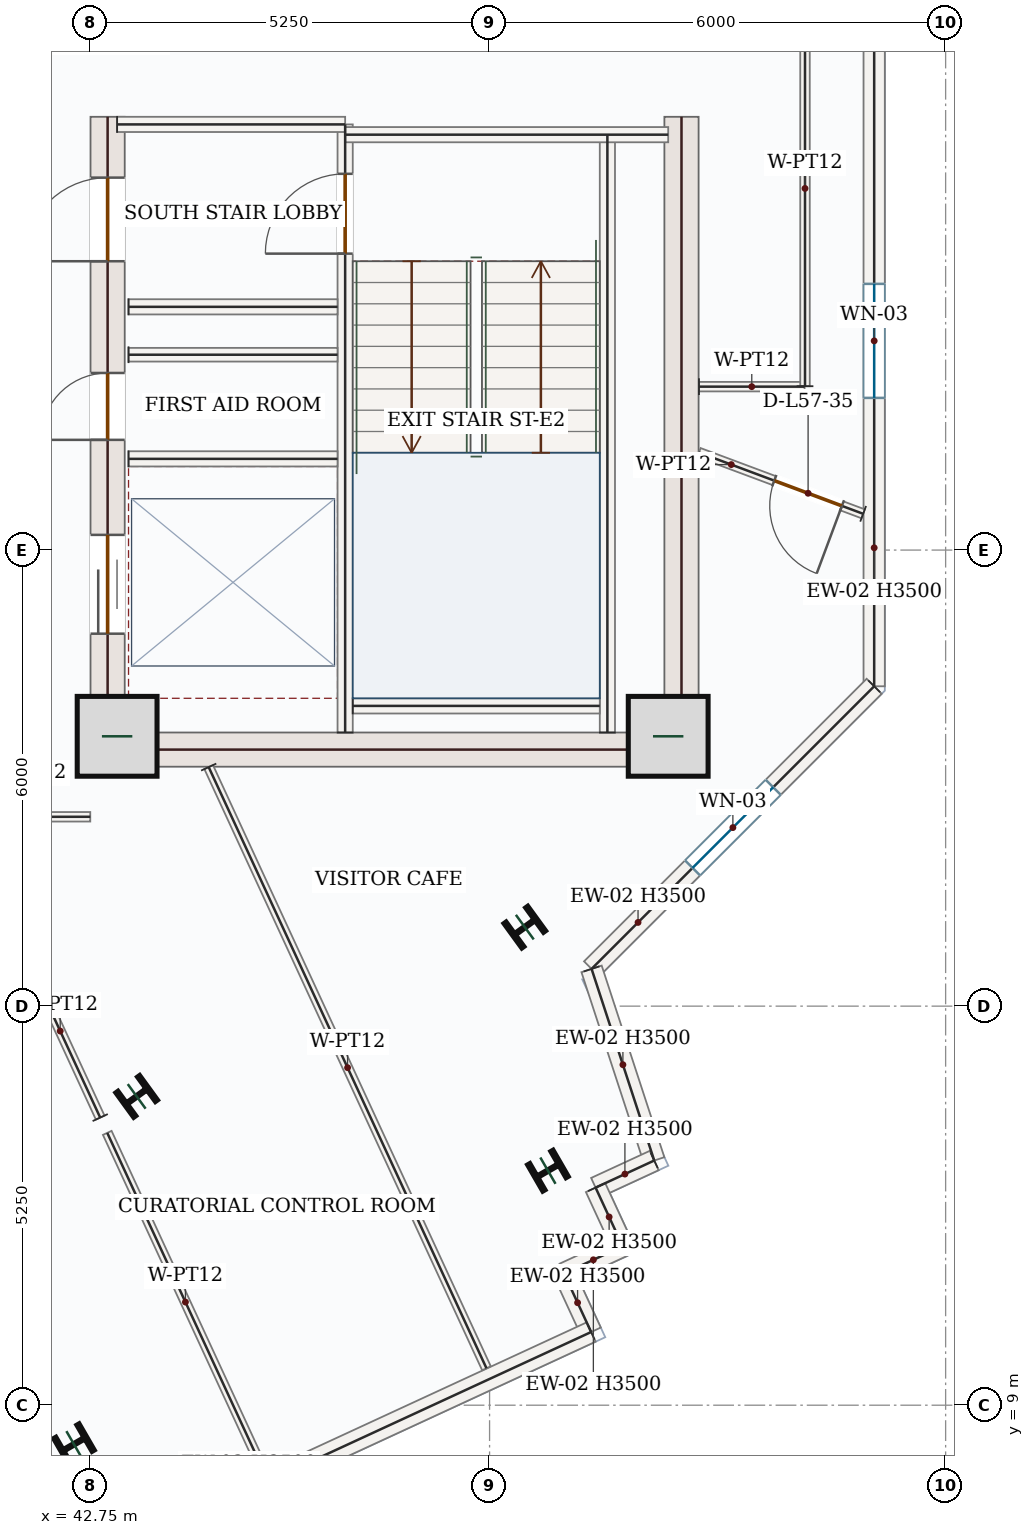
"""IFC4 building model, lengths in metres.
Left out: names, types, materials, properties, quantities, classifications, styles, units other than length and angle.
Written with IfcOpenShell. Run it as: python <this file> out.ifc"""

import sys

from ifc_helpers import new_model, si_unit, direction, frame, frame_2d, origin, origin_2d, place, context, subcontext, project, spatial, rectangle, i_section, extrude, source, transform, mapped, element, fill, save


model = new_model("IFC4")
c1 = context("Model", 3, precision=1e-05, world=origin(), true_north=direction((0.0, 1.0)))
c2 = subcontext(c1, "Body", "Model", "MODEL_VIEW")
j1 = project(units=[si_unit("LENGTHUNIT", "METRE"), si_unit("PLANEANGLEUNIT", "RADIAN")], contexts=[c1])
p1 = place(None, origin())
s1 = spatial("IfcSite", under=j1, at=p1, CompositionType="ELEMENT")
p2 = place(p1, origin())
s2 = spatial("IfcBuilding", under=s1, at=p2, CompositionType="ELEMENT")
p3 = place(p2, frame((0.0, 0.0, 242.85)))
s3 = spatial("IfcBuildingStorey", under=s2, at=p3, CompositionType="ELEMENT", Elevation=242.85)
p4 = place(p3, frame((42.975, 17.4, 0.0), z_axis=(0.0, 0.0, 1.0), x_axis=(0.0, 1.0, 0.0)))
e1 = element("IfcWall", 1, at=p4, inside=s3, PredefinedType="SHEAR", context=c2, shape_type="SweptSolid", body=[
    extrude(rectangle(XDim=8.55, YDim=0.45, at=frame_2d((4.275, 0.0))), origin(), (0.0, 0.0, 1.0), 3.5),
])
p5 = place(p4, frame((6.65, 0.0, 0.0)))
e2 = element("IfcOpeningElement", 2, at=p5, cuts=e1, PredefinedType="OPENING", context=c2, shape_type="SweptSolid", body=[
    extrude(rectangle(XDim=1.1, YDim=2.2, at=frame_2d((0.55, 1.1))), frame((0.0, 0.235, 0.0), z_axis=(0.0, -1.0, 0.0), x_axis=(1.0, 0.0, 0.0)), (0.0, 0.0, 1.0), 0.47),
])
p6 = place(p4, frame((1.75, 0.0, 0.0)))
e3 = element("IfcOpeningElement", 3, at=p6, cuts=e1, PredefinedType="OPENING", context=c2, shape_type="SweptSolid", body=[
    extrude(rectangle(XDim=1.3, YDim=2.2, at=frame_2d((0.65, 1.1))), frame((0.0, 0.235, 0.0), z_axis=(0.0, -1.0, 0.0), x_axis=(1.0, 0.0, 0.0)), (0.0, 0.0, 1.0), 0.47),
])
p7 = place(p4, frame((4.3, 0.0, 0.0)))
e4 = element("IfcOpeningElement", 4, at=p7, cuts=e1, PredefinedType="OPENING", context=c2, shape_type="SweptSolid", body=[
    extrude(rectangle(XDim=0.88, YDim=2.1, at=frame_2d((0.44, 1.05))), frame((0.0, 0.235, 0.0), z_axis=(0.0, -1.0, 0.0), x_axis=(1.0, 0.0, 0.0)), (0.0, 0.0, 1.0), 0.47),
])
m1 = source(origin(), c2, "Body", "SweptSolid", [
    extrude(rectangle(XDim=8.55, YDim=0.45, at=frame_2d((4.275, 0.0))), origin(), (0.0, 0.0, 1.0), 3.5),
])
p8 = place(p3, frame((50.525, 17.4, 0.0), z_axis=(0.0, 0.0, 1.0), x_axis=(0.0, 1.0, 0.0)))
e5 = element("IfcWall", 5, at=p8, inside=s3, PredefinedType="SHEAR", context=c2, shape_type="MappedRepresentation", body=[
    mapped(m1, transform((0.0, 0.0, 0.0), x_axis=(1.0, 0.0, 0.0), y_axis=(0.0, 1.0, 0.0), z_axis=(0.0, 0.0, 1.0), scale=1.0)),
])
m2 = source(origin(), c2, "Body", "SweptSolid", [
    extrude(rectangle(XDim=7.1, YDim=0.45, at=frame_2d((3.55, 0.0))), origin(), (0.0, 0.0, 1.0), 3.5),
])
p9 = place(p3, frame((43.2, 17.625, 0.0), z_axis=(0.0, 0.0, 1.0), x_axis=(1.0, 0.0, 0.0)))
e6 = element("IfcWall", 6, at=p9, inside=s3, PredefinedType="SHEAR", context=c2, shape_type="MappedRepresentation", body=[
    mapped(m2, transform((0.0, 0.0, 0.0), x_axis=(1.0, 0.0, 0.0), y_axis=(0.0, 1.0, 0.0), z_axis=(0.0, 0.0, 1.0), scale=1.0)),
])
m3 = source(origin(), c2, "Body", "SweptSolid", [
    extrude(rectangle(XDim=1.05, YDim=1.05, at=origin_2d()), origin(), (0.0, 0.0, 1.0), 3.75),
])
for number, where, z_axis, x_axis in (
    (7, (43.1, 17.8, 0.0), (0.0, 0.0, 1.0), (1.0, 0.0, 0.0)),
    (8, (50.35, 17.8, 0.0), (0.0, 0.0, 1.0), (1.0, 0.0, 0.0)),
):
    element("IfcColumn", number, at=place(p3, frame(where, z_axis=z_axis, x_axis=x_axis)), inside=s3, PredefinedType="COLUMN", context=c2, shape_type="MappedRepresentation", body=[
        mapped(m3, transform((0.0, 0.0, 0.0), x_axis=(1.0, 0.0, 0.0), y_axis=(0.0, 1.0, 0.0), z_axis=(0.0, 0.0, 1.0), scale=1.0)),
    ])
m4 = source(origin(), c2, "Body", "SweptSolid", [
    extrude(i_section(OverallWidth=0.399, OverallDepth=0.386, WebThickness=0.021, FlangeThickness=0.033, FilletRadius=0.018, at=origin_2d()), origin(), (0.0, 0.0, 1.0), 3.75),
])
for number, where, z_axis, x_axis in (
    (9, (43.357, 13.063, 0.0), (0.0, 0.0, 1.0), (-0.588, 0.809, 0.0)),
    (10, (48.464, 15.289, 0.0), (0.0, 0.0, 1.0), (-0.588, 0.809, 0.0)),
    (11, (42.532, 8.486, 0.0), (0.0, 0.0, 1.0), (-0.5, 0.866, 0.0)),
    (12, (48.768, 12.086, 0.0), (0.0, 0.0, 1.0), (-0.5, 0.866, 0.0)),
):
    element("IfcColumn", number, at=place(p3, frame(where, z_axis=z_axis, x_axis=x_axis)), inside=s3, PredefinedType="COLUMN", context=c2, shape_type="MappedRepresentation", body=[
        mapped(m4, transform((0.0, 0.0, 0.0), x_axis=(1.0, 0.0, 0.0), y_axis=(0.0, 1.0, 0.0), z_axis=(0.0, 0.0, 1.0), scale=1.0)),
    ])
p10 = place(p3, frame((53.06, 27.546, 0.0), z_axis=(0.0, 0.0, 1.0), x_axis=(0.0, -1.0, 0.0)))
e13 = element("IfcWall", 13, at=p10, inside=s3, PredefinedType="SOLIDWALL", context=c2, shape_type="SweptSolid", body=[
    extrude(rectangle(XDim=9.088, YDim=0.28, at=frame_2d((4.544, 0.0))), origin(), (0.0, 0.0, 1.0), 3.5),
])
p11 = place(p10, frame((3.794, 0.0, 0.85)))
e14 = element("IfcOpeningElement", 14, at=p11, cuts=e13, PredefinedType="OPENING", context=c2, shape_type="SweptSolid", body=[
    extrude(rectangle(XDim=1.5, YDim=1.5, at=frame_2d((0.75, 0.75))), frame((0.0, 0.15, 0.0), z_axis=(0.0, -1.0, 0.0), x_axis=(1.0, 0.0, 0.0)), (0.0, 0.0, 1.0), 0.3),
])
p12 = place(p3, frame((53.06, 18.458, 0.0), z_axis=(0.0, 0.0, 1.0), x_axis=(-0.707106781187, -0.707106781187, 0.0)))
e15 = element("IfcWall", 15, at=p12, inside=s3, PredefinedType="SOLIDWALL", context=c2, shape_type="SweptSolid", body=[
    extrude(rectangle(XDim=5.258, YDim=0.28, at=frame_2d((2.629, 0.0))), origin(), (0.0, 0.0, 1.0), 3.5),
])
p13 = place(p12, frame((1.879, 0.0, 0.85)))
e16 = element("IfcOpeningElement", 16, at=p13, cuts=e15, PredefinedType="OPENING", context=c2, shape_type="SweptSolid", body=[
    extrude(rectangle(XDim=1.5, YDim=1.5, at=frame_2d((0.75, 0.75))), frame((0.0, 0.15, 0.0), z_axis=(0.0, -1.0, 0.0), x_axis=(1.0, 0.0, 0.0)), (0.0, 0.0, 1.0), 0.3),
])
m5 = source(origin(), c2, "Body", "SweptSolid", [
    extrude(rectangle(XDim=2.652, YDim=0.28, at=frame_2d((1.326, 0.0))), origin(), (0.0, 0.0, 1.0), 3.5),
])
p14 = place(p3, frame((49.342, 14.74, 0.0), z_axis=(0.0, 0.0, 1.0), x_axis=(0.310838004308, -0.950462905682, 0.0)))
e17 = element("IfcWall", 17, at=p14, inside=s3, PredefinedType="SOLIDWALL", context=c2, shape_type="MappedRepresentation", body=[
    mapped(m5, transform((0.0, 0.0, 0.0), x_axis=(1.0, 0.0, 0.0), y_axis=(0.0, 1.0, 0.0), z_axis=(0.0, 0.0, 1.0), scale=1.0)),
])
m6 = source(origin(), c2, "Body", "SweptSolid", [
    extrude(rectangle(XDim=0.85, YDim=0.28, at=frame_2d((0.425, 0.0))), origin(), (0.0, 0.0, 1.0), 3.5),
])
for number, where, z_axis, x_axis in (
    (18, (50.167, 12.219, 0.0), (0.0, 0.0, 1.0), (-0.908, -0.419, 0.0)),
    (19, (49.395, 11.863, 0.0), (0.0, 0.0, 1.0), (0.419, -0.908, 0.0)),
):
    element("IfcWall", number, at=place(p3, frame(where, z_axis=z_axis, x_axis=x_axis)), inside=s3, PredefinedType="SOLIDWALL", context=c2, shape_type="MappedRepresentation", body=[
        mapped(m6, transform((0.0, 0.0, 0.0), x_axis=(1.0, 0.0, 0.0), y_axis=(0.0, 1.0, 0.0), z_axis=(0.0, 0.0, 1.0), scale=1.0)),
    ])
m7 = source(origin(), c2, "Body", "SweptSolid", [
    extrude(rectangle(XDim=0.85, YDim=0.28, at=frame_2d((0.425, 0.0))), origin(), (0.0, 0.0, 1.0), 3.5),
])
p15 = place(p3, frame((49.751, 11.091, 0.0), z_axis=(0.0, 0.0, 1.0), x_axis=(-0.907791150023, -0.419422493365, 0.0)))
e20 = element("IfcWall", 20, at=p15, inside=s3, PredefinedType="SOLIDWALL", context=c2, shape_type="MappedRepresentation", body=[
    mapped(m7, transform((0.0, 0.0, 0.0), x_axis=(1.0, 0.0, 0.0), y_axis=(0.0, 1.0, 0.0), z_axis=(0.0, 0.0, 1.0), scale=1.0)),
])
p16 = place(p3, frame((48.98, 10.734, 0.0), z_axis=(0.0, 0.0, 1.0), x_axis=(0.419313139191, -0.907841666427, 0.0)))
e21 = element("IfcWall", 21, at=p16, inside=s3, PredefinedType="SOLIDWALL", context=c2, shape_type="MappedRepresentation", body=[
    mapped(m6, transform((0.0, 0.0, 0.0), x_axis=(1.0, 0.0, 0.0), y_axis=(0.0, 1.0, 0.0), z_axis=(0.0, 0.0, 1.0), scale=1.0)),
])
m8 = source(origin(), c2, "Body", "SweptSolid", [
    extrude(rectangle(XDim=9.92, YDim=0.28, at=frame_2d((4.96, 0.0))), origin(), (0.0, 0.0, 1.0), 3.5),
])
p17 = place(p3, frame((49.336, 9.963, 0.0), z_axis=(0.0, 0.0, 1.0), x_axis=(-0.907779940536, -0.419446754143, 0.0)))
e22 = element("IfcWall", 22, at=p17, inside=s3, PredefinedType="SOLIDWALL", context=c2, shape_type="MappedRepresentation", body=[
    mapped(m8, transform((0.0, 0.0, 0.0), x_axis=(1.0, 0.0, 0.0), y_axis=(0.0, 1.0, 0.0), z_axis=(0.0, 0.0, 1.0), scale=1.0)),
])
m9 = source(origin(), c2, "Body", "SweptSolid", [
    extrude(rectangle(XDim=7.87, YDim=0.2, at=frame_2d((3.935, 0.0))), origin(), (0.0, 0.0, 1.0), 3.5),
])
p18 = place(p3, frame((49.55, 17.85, 0.0), z_axis=(0.0, 0.0, 1.0), x_axis=(0.0, 1.0, 0.0)))
e23 = element("IfcWall", 23, at=p18, inside=s3, PredefinedType="SOLIDWALL", context=c2, shape_type="MappedRepresentation", body=[
    mapped(m9, transform((0.0, 0.0, 0.0), x_axis=(1.0, 0.0, 0.0), y_axis=(0.0, 1.0, 0.0), z_axis=(0.0, 0.0, 1.0), scale=1.0)),
])
p19 = place(p3, frame((46.1, 17.85, 0.0), z_axis=(0.0, 0.0, 1.0), x_axis=(0.0, 1.0, 0.0)))
e24 = element("IfcWall", 24, at=p19, inside=s3, PredefinedType="SOLIDWALL", context=c2, shape_type="SweptSolid", body=[
    extrude(rectangle(XDim=8.0, YDim=0.2, at=frame_2d((4.0, 0.0))), origin(), (0.0, 0.0, 1.0), 3.5),
])
p20 = place(p19, frame((6.3, 0.0, 0.0)))
e25 = element("IfcOpeningElement", 25, at=p20, cuts=e24, PredefinedType="OPENING", context=c2, shape_type="SweptSolid", body=[
    extrude(rectangle(XDim=1.05, YDim=2.15, at=frame_2d((0.525, 1.075))), frame((0.0, 0.11, 0.0), z_axis=(0.0, -1.0, 0.0), x_axis=(1.0, 0.0, 0.0)), (0.0, 0.0, 1.0), 0.22),
])
m10 = source(origin(), c2, "Body", "SweptSolid", [
    extrude(rectangle(XDim=3.0, YDim=0.2, at=frame_2d((1.5, 0.0))), origin(), (0.0, 0.0, 1.0), 3.5),
])
p21 = place(p3, frame((43.1, 25.85, 0.0), z_axis=(0.0, 0.0, 1.0), x_axis=(1.0, 0.0, 0.0)))
e26 = element("IfcWall", 26, at=p21, inside=s3, PredefinedType="SOLIDWALL", context=c2, shape_type="MappedRepresentation", body=[
    mapped(m10, transform((0.0, 0.0, 0.0), x_axis=(1.0, 0.0, 0.0), y_axis=(0.0, 1.0, 0.0), z_axis=(0.0, 0.0, 1.0), scale=1.0)),
])
m11 = source(origin(), c2, "Body", "SweptSolid", [
    extrude(rectangle(XDim=4.25, YDim=0.2, at=frame_2d((2.125, 0.0))), origin(), (0.0, 0.0, 1.0), 3.5),
])
p22 = place(p3, frame((46.1, 25.715, 0.0), z_axis=(0.0, 0.0, 1.0), x_axis=(1.0, 0.0, 0.0)))
e27 = element("IfcWall", 27, at=p22, inside=s3, PredefinedType="SOLIDWALL", context=c2, shape_type="MappedRepresentation", body=[
    mapped(m11, transform((0.0, 0.0, 0.0), x_axis=(1.0, 0.0, 0.0), y_axis=(0.0, 1.0, 0.0), z_axis=(0.0, 0.0, 1.0), scale=1.0)),
])
m12 = source(origin(), c2, "Body", "SweptSolid", [
    extrude(rectangle(XDim=3.25, YDim=0.2, at=frame_2d((1.625, 0.0))), origin(), (0.0, 0.0, 1.0), 3.5),
])
p23 = place(p3, frame((46.2, 18.2, 0.0), z_axis=(0.0, 0.0, 1.0), x_axis=(1.0, 0.0, 0.0)))
e28 = element("IfcWall", 28, at=p23, inside=s3, PredefinedType="SOLIDWALL", context=c2, shape_type="MappedRepresentation", body=[
    mapped(m12, transform((0.0, 0.0, 0.0), x_axis=(1.0, 0.0, 0.0), y_axis=(0.0, 1.0, 0.0), z_axis=(0.0, 0.0, 1.0), scale=1.0)),
])
m13 = source(origin(), c2, "Body", "SweptSolid", [
    extrude(rectangle(XDim=2.75, YDim=0.2, at=frame_2d((1.375, 0.0))), origin(), (0.0, 0.0, 1.0), 3.5),
])
for number, where, z_axis, x_axis in (
    (29, (43.25, 23.45, 0.0), (0.0, 0.0, 1.0), (1.0, 0.0, 0.0)),
    (30, (43.25, 21.45, 0.0), (0.0, 0.0, 1.0), (1.0, 0.0, 0.0)),
):
    element("IfcWall", number, at=place(p3, frame(where, z_axis=z_axis, x_axis=x_axis)), inside=s3, PredefinedType="SOLIDWALL", context=c2, shape_type="MappedRepresentation", body=[
        mapped(m13, transform((0.0, 0.0, 0.0), x_axis=(1.0, 0.0, 0.0), y_axis=(0.0, 1.0, 0.0), z_axis=(0.0, 0.0, 1.0), scale=1.0)),
    ])
m14 = source(origin(), c2, "Body", "SweptSolid", [
    extrude(rectangle(XDim=2.75, YDim=0.18, at=frame_2d((1.375, 0.0))), origin(), (0.0, 0.0, 1.0), 3.5),
])
p24 = place(p3, frame((43.25, 22.82, 0.0), z_axis=(0.0, 0.0, 1.0), x_axis=(1.0, 0.0, 0.0)))
e31 = element("IfcWall", 31, at=p24, inside=s3, PredefinedType="PARTITIONING", context=c2, shape_type="MappedRepresentation", body=[
    mapped(m14, transform((0.0, 0.0, 0.0), x_axis=(1.0, 0.0, 0.0), y_axis=(0.0, 1.0, 0.0), z_axis=(0.0, 0.0, 1.0), scale=1.0)),
])
m15 = source(origin(), c2, "Body", "SweptSolid", [
    extrude(rectangle(XDim=4.904, YDim=0.125, at=frame_2d((2.452, 0.0))), origin(), (0.0, 0.0, 1.0), 3.5),
])
p25 = place(p3, frame((45.027, 8.131, 0.0), z_axis=(0.0, 0.0, 1.0), x_axis=(-0.419459107568, 0.907774232438, 0.0)))
e32 = element("IfcWall", 32, at=p25, inside=s3, PredefinedType="PARTITIONING", context=c2, shape_type="MappedRepresentation", body=[
    mapped(m15, transform((0.0, 0.0, 0.0), x_axis=(1.0, 0.0, 0.0), y_axis=(0.0, 1.0, 0.0), z_axis=(0.0, 0.0, 1.0), scale=1.0)),
])
p26 = place(p3, frame((42.877, 12.784, 0.0), z_axis=(0.0, 0.0, 1.0), x_axis=(-0.419416941906, 0.907793714917, 0.0)))
e33 = element("IfcWall", 33, at=p26, inside=s3, PredefinedType="PARTITIONING", context=c2, shape_type="SweptSolid", body=[
    extrude(rectangle(XDim=4.358, YDim=0.125, at=frame_2d((2.179, 0.0))), origin(), (0.0, 0.0, 1.0), 3.5),
])
p27 = place(p26, frame((2.658, 0.0, 0.0)))
e34 = element("IfcOpeningElement", 34, at=p27, cuts=e33, PredefinedType="OPENING", context=c2, shape_type="SweptSolid", body=[
    extrude(rectangle(XDim=0.95, YDim=2.15, at=frame_2d((0.475, 1.075))), frame((0.0, 0.073, 0.0), z_axis=(0.0, -1.0, 0.0), x_axis=(1.0, 0.0, 0.0)), (0.0, 0.0, 1.0), 0.145),
])
m16 = source(origin(), c2, "Body", "SweptSolid", [
    extrude(rectangle(XDim=1.623, YDim=0.125, at=frame_2d((0.812, 0.0))), origin(), (0.0, 0.0, 1.0), 3.5),
])
p28 = place(p3, frame((41.124, 16.74, 0.0), z_axis=(0.0, 0.0, 1.0), x_axis=(0.999999717168, 0.000752105684, 0.0)))
e35 = element("IfcWall", 35, at=p28, inside=s3, PredefinedType="PARTITIONING", context=c2, shape_type="MappedRepresentation", body=[
    mapped(m16, transform((0.0, 0.0, 0.0), x_axis=(1.0, 0.0, 0.0), y_axis=(0.0, 1.0, 0.0), z_axis=(0.0, 0.0, 1.0), scale=1.0)),
])
m17 = source(origin(), c2, "Body", "SweptSolid", [
    extrude(rectangle(XDim=8.712, YDim=0.125, at=frame_2d((4.356, 0.0))), origin(), (0.0, 0.0, 1.0), 3.5),
])
p29 = place(p3, frame((44.305, 17.395, 0.0), z_axis=(0.0, 0.0, 1.0), x_axis=(0.419438424399, -0.907783789312, 0.0)))
e36 = element("IfcWall", 36, at=p29, inside=s3, PredefinedType="PARTITIONING", context=c2, shape_type="MappedRepresentation", body=[
    mapped(m17, transform((0.0, 0.0, 0.0), x_axis=(1.0, 0.0, 0.0), y_axis=(0.0, 1.0, 0.0), z_axis=(0.0, 0.0, 1.0), scale=1.0)),
])
m18 = source(origin(), c2, "Body", "SweptSolid", [
    extrude(rectangle(XDim=1.389, YDim=0.125, at=frame_2d((0.695, 0.0))), origin(), (0.0, 0.0, 1.0), 3.5),
])
p30 = place(p3, frame((50.755, 22.4, 0.0), z_axis=(0.0, 0.0, 1.0), x_axis=(1.0, 0.0, 0.0)))
e37 = element("IfcWall", 37, at=p30, inside=s3, PredefinedType="PARTITIONING", context=c2, shape_type="MappedRepresentation", body=[
    mapped(m18, transform((0.0, 0.0, 0.0), x_axis=(1.0, 0.0, 0.0), y_axis=(0.0, 1.0, 0.0), z_axis=(0.0, 0.0, 1.0), scale=1.0)),
])
p31 = place(p3, frame((52.15, 22.406, 0.0), z_axis=(0.0, 0.0, 1.0), x_axis=(-2.657666e-05, 0.999999999647, 0.0)))
e38 = element("IfcWall", 38, at=p31, inside=s3, PredefinedType="PARTITIONING", context=c2, shape_type="SweptSolid", body=[
    extrude(rectangle(XDim=9.186, YDim=0.125, at=frame_2d((4.593, 0.0))), origin(), (0.0, 0.0, 1.0), 3.5),
])
p32 = place(p31, frame((5.354, 0.0, 0.0)))
e39 = element("IfcOpeningElement", 39, at=p32, cuts=e38, PredefinedType="OPENING", context=c2, shape_type="SweptSolid", body=[
    extrude(rectangle(XDim=0.95, YDim=2.15, at=frame_2d((0.475, 1.075))), frame((0.0, 0.073, 0.0), z_axis=(0.0, -1.0, 0.0), x_axis=(1.0, 0.0, 0.0)), (0.0, 0.0, 1.0), 0.145),
])
p33 = place(p3, frame((52.915, 20.727, 0.0), z_axis=(0.0, 0.0, 1.0), x_axis=(-0.936884992217, 0.349637685839, 0.0)))
e40 = element("IfcWall", 40, at=p33, inside=s3, PredefinedType="PARTITIONING", context=c2, shape_type="SweptSolid", body=[
    extrude(rectangle(XDim=2.306, YDim=0.125, at=frame_2d((1.153, 0.0))), origin(), (0.0, 0.0, 1.0), 3.5),
])
p34 = place(p33, frame((0.298, 0.0, 0.0)))
e41 = element("IfcOpeningElement", 41, at=p34, cuts=e40, PredefinedType="OPENING", context=c2, shape_type="SweptSolid", body=[
    extrude(rectangle(XDim=0.95, YDim=2.15, at=frame_2d((0.475, 1.075))), frame((0.0, 0.073, 0.0), z_axis=(0.0, -1.0, 0.0), x_axis=(1.0, 0.0, 0.0)), (0.0, 0.0, 1.0), 0.145),
])
m19 = source(origin(), c2, "Body", "SweptSolid", [
    extrude(rectangle(XDim=1.5, YDim=1.5, at=frame_2d((0.75, 0.75))), frame((0.0, 0.03, 0.0), z_axis=(0.0, -1.0, 0.0), x_axis=(1.0, 0.0, 0.0)), (0.0, 0.0, 1.0), 0.06),
])
p35 = place(p11, origin())
e42 = element("IfcWindow", 42, at=p35, inside=s3, PartitioningType="SINGLE_PANEL", PredefinedType="WINDOW", context=c2, shape_type="MappedRepresentation", body=[
    mapped(m19, transform((0.0, 0.0, 0.0), x_axis=(1.0, 0.0, 0.0), y_axis=(0.0, 1.0, 0.0), z_axis=(0.0, 0.0, 1.0), scale=1.0)),
])
fill(e14, e42)
p36 = place(p13, origin())
e43 = element("IfcWindow", 43, at=p36, inside=s3, PartitioningType="SINGLE_PANEL", PredefinedType="WINDOW", context=c2, shape_type="MappedRepresentation", body=[
    mapped(m19, transform((0.0, 0.0, 0.0), x_axis=(1.0, 0.0, 0.0), y_axis=(0.0, 1.0, 0.0), z_axis=(0.0, 0.0, 1.0), scale=1.0)),
])
fill(e16, e43)
m20 = source(origin(), c2, "Body", "SweptSolid", [
    extrude(rectangle(XDim=1.05, YDim=2.15, at=frame_2d((0.525, 1.075))), frame((0.0, 0.025, 0.0), z_axis=(0.0, -1.0, 0.0), x_axis=(1.0, 0.0, 0.0)), (0.0, 0.0, 1.0), 0.05),
])
p37 = place(p20, origin())
e44 = element("IfcDoor", 44, at=p37, inside=s3, OperationType="SINGLE_SWING_LEFT", PredefinedType="DOOR", context=c2, shape_type="MappedRepresentation", body=[
    mapped(m20, transform((0.0, 0.0, 0.0), x_axis=(1.0, 0.0, 0.0), y_axis=(0.0, 1.0, 0.0), z_axis=(0.0, 0.0, 1.0), scale=1.0)),
])
fill(e25, e44)
m21 = source(origin(), c2, "Body", "SweptSolid", [
    extrude(rectangle(XDim=1.1, YDim=2.2, at=frame_2d((0.55, 1.1))), frame((0.0, 0.025, 0.0), z_axis=(0.0, -1.0, 0.0), x_axis=(1.0, 0.0, 0.0)), (0.0, 0.0, 1.0), 0.05),
])
p38 = place(p5, origin())
e45 = element("IfcDoor", 45, at=p38, inside=s3, OperationType="SINGLE_SWING_LEFT", PredefinedType="DOOR", context=c2, shape_type="MappedRepresentation", body=[
    mapped(m21, transform((0.0, 0.0, 0.0), x_axis=(1.0, 0.0, 0.0), y_axis=(0.0, 1.0, 0.0), z_axis=(0.0, 0.0, 1.0), scale=1.0)),
])
fill(e2, e45)
m22 = source(origin(), c2, "Body", "SweptSolid", [
    extrude(rectangle(XDim=1.3, YDim=2.2, at=frame_2d((0.65, 1.1))), frame((0.0, 0.025, 0.0), z_axis=(0.0, -1.0, 0.0), x_axis=(1.0, 0.0, 0.0)), (0.0, 0.0, 1.0), 0.05),
])
p39 = place(p6, origin())
e46 = element("IfcDoor", 46, at=p39, inside=s3, OperationType="DOUBLE_DOOR_SLIDING", PredefinedType="DOOR", context=c2, shape_type="MappedRepresentation", body=[
    mapped(m22, transform((0.0, 0.0, 0.0), x_axis=(1.0, 0.0, 0.0), y_axis=(0.0, 1.0, 0.0), z_axis=(0.0, 0.0, 1.0), scale=1.0)),
])
fill(e3, e46)
m23 = source(origin(), c2, "Body", "SweptSolid", [
    extrude(rectangle(XDim=0.88, YDim=2.1, at=frame_2d((0.44, 1.05))), frame((0.0, 0.025, 0.0), z_axis=(0.0, -1.0, 0.0), x_axis=(1.0, 0.0, 0.0)), (0.0, 0.0, 1.0), 0.05),
])
p40 = place(p7, origin())
e47 = element("IfcDoor", 47, at=p40, inside=s3, OperationType="SINGLE_SWING_LEFT", PredefinedType="DOOR", context=c2, shape_type="MappedRepresentation", body=[
    mapped(m23, transform((0.0, 0.0, 0.0), x_axis=(1.0, 0.0, 0.0), y_axis=(0.0, 1.0, 0.0), z_axis=(0.0, 0.0, 1.0), scale=1.0)),
])
fill(e4, e47)
m24 = source(origin(), c2, "Body", "SweptSolid", [
    extrude(rectangle(XDim=0.95, YDim=2.15, at=frame_2d((0.475, 1.075))), frame((0.0, 0.025, 0.0), z_axis=(0.0, -1.0, 0.0), x_axis=(1.0, 0.0, 0.0)), (0.0, 0.0, 1.0), 0.05),
])
p41 = place(p34, origin())
e48 = element("IfcDoor", 48, at=p41, inside=s3, OperationType="SINGLE_SWING_LEFT", PredefinedType="DOOR", context=c2, shape_type="MappedRepresentation", body=[
    mapped(m24, transform((0.0, 0.0, 0.0), x_axis=(1.0, 0.0, 0.0), y_axis=(0.0, 1.0, 0.0), z_axis=(0.0, 0.0, 1.0), scale=1.0)),
])
fill(e41, e48)
save(model, sys.argv[1])
